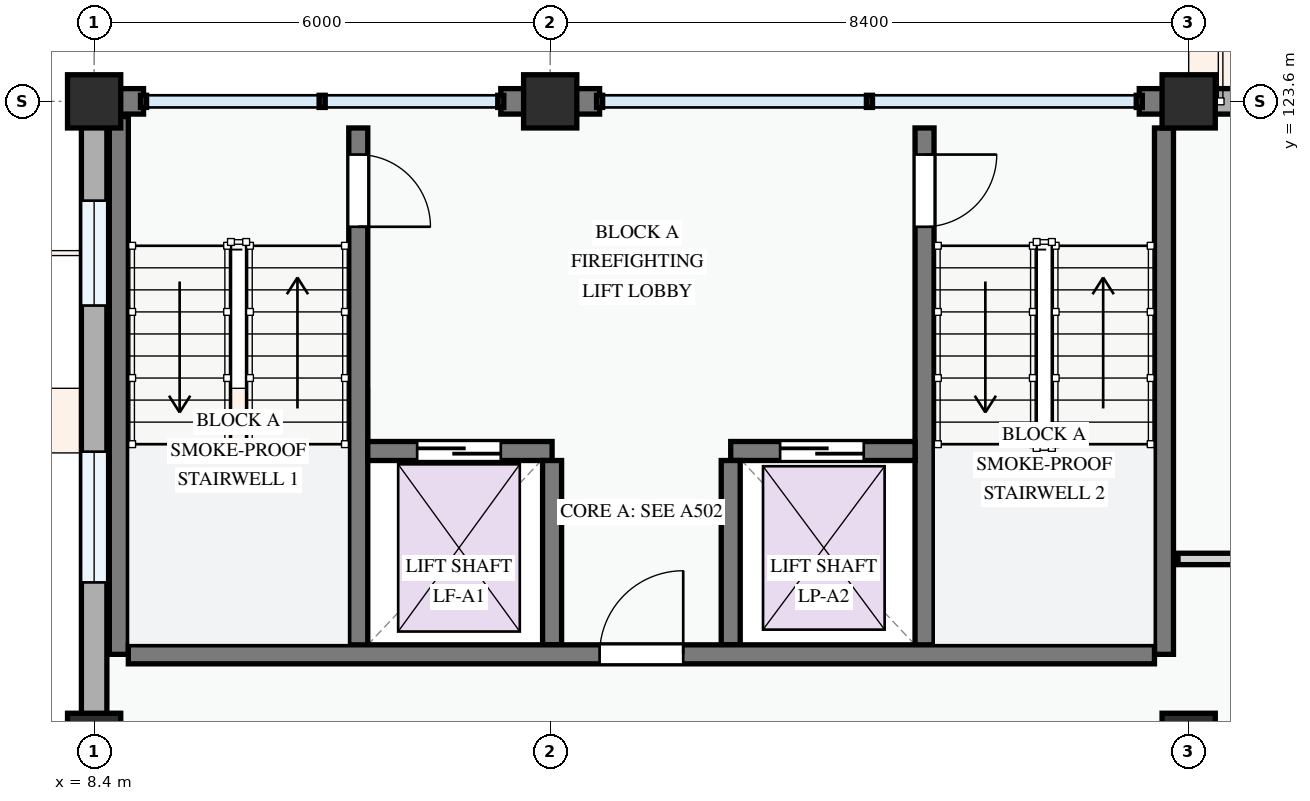
"""IFC4 building model, lengths in metres.
Left out: names, types, materials, properties, quantities, classifications, styles, units other than length and angle.
Written with IfcOpenShell. Run it as: python <this file> out.ifc"""

import sys

from ifc_helpers import new_model, si_unit, direction, frame, frame_2d, origin, origin_2d, place, context, subcontext, project, spatial, rectangle, extrude, element, fill, save


model = new_model("IFC4")
c1 = context("Model", 3, precision=1e-05, world=origin(), true_north=direction((0.0, 1.0)))
c2 = subcontext(c1, "Body", "Model", "MODEL_VIEW")
j1 = project(units=[si_unit("LENGTHUNIT", "METRE"), si_unit("PLANEANGLEUNIT", "RADIAN")], contexts=[c1])
p1 = place(None, origin())
s1 = spatial("IfcSite", under=j1, at=p1, CompositionType="ELEMENT")
p2 = place(p1, origin())
s2 = spatial("IfcBuilding", under=s1, at=p2, CompositionType="ELEMENT")
p3 = place(p2, frame((0.0, 0.0, 18.0)))
s3 = spatial("IfcBuildingStorey", under=s2, at=p3, CompositionType="ELEMENT", Elevation=18.0)
for number, where, z_axis, x_axis in (
    (1, (8.4, 115.2, 0.0), (0.0, 0.0, 1.0), (1.0, 0.0, 0.0)),
    (2, (8.4, 123.6, 0.0), (0.0, 0.0, 1.0), (1.0, 0.0, 0.0)),
    (3, (14.4, 123.6, 0.0), (0.0, 0.0, 1.0), (1.0, 0.0, 0.0)),
    (4, (22.8, 115.2, 0.0), (0.0, 0.0, 1.0), (1.0, 0.0, 0.0)),
    (5, (22.8, 123.6, 0.0), (0.0, 0.0, 1.0), (1.0, 0.0, 0.0)),
):
    element("IfcColumn", number, at=place(p3, frame(where, z_axis=z_axis, x_axis=x_axis)), inside=s3, PredefinedType="COLUMN", context=c2, shape_type="SweptSolid", body=[
        extrude(rectangle(XDim=0.7, YDim=0.7, at=origin_2d()), origin(), (0.0, 0.0, 1.0), 3.3),
    ])
p4 = place(p3, frame((28.8, 123.6, 0.0), z_axis=(0.0, 0.0, 1.0), x_axis=(-1.0, 0.0, 0.0)))
e6 = element("IfcWall", 6, at=p4, inside=s3, PredefinedType="STANDARD", context=c2, shape_type="SweptSolid", body=[
    extrude(rectangle(XDim=6.0, YDim=0.335, at=frame_2d((3.0, 0.0))), origin(), (0.0, 0.0, 1.0), 2.475),
])
p5 = place(p4, frame((0.62, 0.0, 0.0)))
e7 = element("IfcOpeningElement", 7, at=p5, cuts=e6, PredefinedType="OPENING", context=c2, shape_type="SweptSolid", body=[
    extrude(rectangle(XDim=1.5, YDim=2.2, at=frame_2d((0.75, 1.1))), frame((0.0, 0.177, 0.0), z_axis=(0.0, -1.0, 0.0), x_axis=(1.0, 0.0, 0.0)), (0.0, 0.0, 1.0), 0.355),
])
p6 = place(p4, frame((3.215, 0.0, 0.78)))
e8 = element("IfcOpeningElement", 8, at=p6, cuts=e6, PredefinedType="OPENING", context=c2, shape_type="SweptSolid", body=[
    extrude(rectangle(XDim=1.55, YDim=1.4, at=frame_2d((0.775, 0.7))), frame((0.0, 0.177, 0.0), z_axis=(0.0, -1.0, 0.0), x_axis=(1.0, 0.0, 0.0)), (0.0, 0.0, 1.0), 0.355),
])
for number, where, z_axis, x_axis in (
    (9, (22.8, 123.6, 0.0), (0.0, 0.0, 1.0), (-1.0, 0.0, 0.0)),
    (10, (15.05, 123.6, 0.0), (0.0, 0.0, 1.0), (-1.0, 0.0, 0.0)),
):
    element("IfcWall", number, at=place(p3, frame(where, z_axis=z_axis, x_axis=x_axis)), inside=s3, PredefinedType="STANDARD", context=c2, shape_type="SweptSolid", body=[
        extrude(rectangle(XDim=0.65, YDim=0.335, at=frame_2d((0.325, 0.0))), origin(), (0.0, 0.0, 1.0), 3.04),
    ])
p7 = place(p3, frame((14.4, 123.6, 0.0), z_axis=(0.0, 0.0, 1.0), x_axis=(-1.0, 0.0, 0.0)))
e11 = element("IfcWall", 11, at=p7, inside=s3, PredefinedType="STANDARD", context=c2, shape_type="SweptSolid", body=[
    extrude(rectangle(XDim=0.65, YDim=0.335, at=frame_2d((0.325, 0.0))), origin(), (0.0, 0.0, 1.0), 3.04),
])
p8 = place(p3, frame((9.05, 123.6, 0.0), z_axis=(0.0, 0.0, 1.0), x_axis=(-1.0, 0.0, 0.0)))
e12 = element("IfcWall", 12, at=p8, inside=s3, PredefinedType="STANDARD", context=c2, shape_type="SweptSolid", body=[
    extrude(rectangle(XDim=0.48, YDim=0.335, at=frame_2d((0.24, 0.0))), origin(), (0.0, 0.0, 1.0), 3.04),
])
p9 = place(p3, frame((8.4, 123.6, 0.0), z_axis=(0.0, 0.0, 1.0), x_axis=(0.0, -1.0, 0.0)))
e13 = element("IfcWall", 13, at=p9, inside=s3, PredefinedType="STANDARD", context=c2, shape_type="SweptSolid", body=[
    extrude(rectangle(XDim=8.4, YDim=0.335, at=frame_2d((4.2, 0.0))), origin(), (0.0, 0.0, 1.0), 2.425),
])
p10 = place(p9, frame((1.306, 0.0, 0.78)))
e14 = element("IfcOpeningElement", 14, at=p10, cuts=e13, PredefinedType="OPENING", context=c2, shape_type="SweptSolid", body=[
    extrude(rectangle(XDim=1.38, YDim=1.48, at=frame_2d((0.69, 0.74))), frame((0.0, 0.177, 0.0), z_axis=(0.0, -1.0, 0.0), x_axis=(1.0, 0.0, 0.0)), (0.0, 0.0, 1.0), 0.355),
])
p11 = place(p9, frame((4.609, 0.0, 0.78)))
e15 = element("IfcOpeningElement", 15, at=p11, cuts=e13, PredefinedType="OPENING", context=c2, shape_type="SweptSolid", body=[
    extrude(rectangle(XDim=1.72, YDim=1.52, at=frame_2d((0.86, 0.76))), frame((0.0, 0.177, 0.0), z_axis=(0.0, -1.0, 0.0), x_axis=(1.0, 0.0, 0.0)), (0.0, 0.0, 1.0), 0.355),
])
p12 = place(p3, frame((11.875, 123.25, 0.0), z_axis=(0.0, 0.0, 1.0), x_axis=(0.0, -1.0, 0.0)))
e16 = element("IfcWall", 16, at=p12, inside=s3, PredefinedType="SHEAR", context=c2, shape_type="SweptSolid", body=[
    extrude(rectangle(XDim=6.925, YDim=0.25, at=frame_2d((3.462, 0.0))), origin(), (0.0, 0.0, 1.0), 3.0),
])
p13 = place(p12, frame((0.35, 0.0, 0.0)))
e17 = element("IfcOpeningElement", 17, at=p13, cuts=e16, PredefinedType="OPENING", context=c2, shape_type="SweptSolid", body=[
    extrude(rectangle(XDim=0.95, YDim=2.1, at=frame_2d((0.475, 1.05))), frame((0.0, 0.135, 0.0), z_axis=(0.0, -1.0, 0.0), x_axis=(1.0, 0.0, 0.0)), (0.0, 0.0, 1.0), 0.27),
])
p14 = place(p3, frame((8.725, 123.4, 0.0), z_axis=(0.0, 0.0, 1.0), x_axis=(0.0, -1.0, 0.0)))
e18 = element("IfcWall", 18, at=p14, inside=s3, PredefinedType="SHEAR", context=c2, shape_type="SweptSolid", body=[
    extrude(rectangle(XDim=7.075, YDim=0.25, at=frame_2d((3.538, 0.0))), origin(), (0.0, 0.0, 1.0), 3.0),
])
p15 = place(p3, frame((22.475, 123.25, 0.0), z_axis=(0.0, 0.0, 1.0), x_axis=(0.0, -1.0, 0.0)))
e19 = element("IfcWall", 19, at=p15, inside=s3, PredefinedType="SHEAR", context=c2, shape_type="SweptSolid", body=[
    extrude(rectangle(XDim=6.925, YDim=0.25, at=frame_2d((3.462, 0.0))), origin(), (0.0, 0.0, 1.0), 3.0),
])
p16 = place(p3, frame((19.325, 123.25, 0.0), z_axis=(0.0, 0.0, 1.0), x_axis=(0.0, -1.0, 0.0)))
e20 = element("IfcWall", 20, at=p16, inside=s3, PredefinedType="SHEAR", context=c2, shape_type="SweptSolid", body=[
    extrude(rectangle(XDim=6.925, YDim=0.25, at=frame_2d((3.462, 0.0))), origin(), (0.0, 0.0, 1.0), 3.0),
])
p17 = place(p16, frame((0.35, 0.0, 0.0)))
e21 = element("IfcOpeningElement", 21, at=p17, cuts=e20, PredefinedType="OPENING", context=c2, shape_type="SweptSolid", body=[
    extrude(rectangle(XDim=0.95, YDim=2.1, at=frame_2d((0.475, 1.05))), frame((0.0, 0.135, 0.0), z_axis=(0.0, -1.0, 0.0), x_axis=(1.0, 0.0, 0.0)), (0.0, 0.0, 1.0), 0.27),
])
p18 = place(p3, frame((12.0, 119.0, 0.0), z_axis=(0.0, 0.0, 1.0), x_axis=(1.0, 0.0, 0.0)))
e22 = element("IfcWall", 22, at=p18, inside=s3, PredefinedType="SHEAR", context=c2, shape_type="SweptSolid", body=[
    extrude(rectangle(XDim=2.425, YDim=0.25, at=frame_2d((1.212, 0.0))), origin(), (0.0, 0.0, 1.0), 3.0),
])
p19 = place(p18, frame((0.65, 0.0, 0.0)))
e23 = element("IfcOpeningElement", 23, at=p19, cuts=e22, PredefinedType="OPENING", context=c2, shape_type="SweptSolid", body=[
    extrude(rectangle(XDim=1.1, YDim=2.15, at=frame_2d((0.55, 1.075))), frame((0.0, 0.135, 0.0), z_axis=(0.0, -1.0, 0.0), x_axis=(1.0, 0.0, 0.0)), (0.0, 0.0, 1.0), 0.27),
])
p20 = place(p3, frame((16.775, 119.0, 0.0), z_axis=(0.0, 0.0, 1.0), x_axis=(1.0, 0.0, 0.0)))
e24 = element("IfcWall", 24, at=p20, inside=s3, PredefinedType="SHEAR", context=c2, shape_type="SweptSolid", body=[
    extrude(rectangle(XDim=2.425, YDim=0.25, at=frame_2d((1.212, 0.0))), origin(), (0.0, 0.0, 1.0), 3.0),
])
p21 = place(p20, frame((0.65, 0.0, 0.0)))
e25 = element("IfcOpeningElement", 25, at=p21, cuts=e24, PredefinedType="OPENING", context=c2, shape_type="SweptSolid", body=[
    extrude(rectangle(XDim=1.1, YDim=2.15, at=frame_2d((0.55, 1.075))), frame((0.0, 0.135, 0.0), z_axis=(0.0, -1.0, 0.0), x_axis=(1.0, 0.0, 0.0)), (0.0, 0.0, 1.0), 0.27),
])
for number, where, z_axis, x_axis in (
    (26, (14.425, 118.875, 0.0), (0.0, 0.0, 1.0), (0.0, -1.0, 0.0)),
    (27, (16.775, 118.875, 0.0), (0.0, 0.0, 1.0), (0.0, -1.0, 0.0)),
):
    element("IfcWall", number, at=place(p3, frame(where, z_axis=z_axis, x_axis=x_axis)), inside=s3, PredefinedType="SHEAR", context=c2, shape_type="SweptSolid", body=[
        extrude(rectangle(XDim=2.425, YDim=0.25, at=frame_2d((1.212, 0.0))), origin(), (0.0, 0.0, 1.0), 3.0),
    ])
p22 = place(p3, frame((8.85, 116.325, 0.0), z_axis=(0.0, 0.0, 1.0), x_axis=(1.0, 0.0, 0.0)))
e28 = element("IfcWall", 28, at=p22, inside=s3, PredefinedType="SHEAR", context=c2, shape_type="SweptSolid", body=[
    extrude(rectangle(XDim=13.5, YDim=0.25, at=frame_2d((6.75, 0.0))), origin(), (0.0, 0.0, 1.0), 3.0),
])
p23 = place(p22, frame((6.2, 0.0, 0.0)))
e29 = element("IfcOpeningElement", 29, at=p23, cuts=e28, PredefinedType="OPENING", context=c2, shape_type="SweptSolid", body=[
    extrude(rectangle(XDim=1.1, YDim=2.15, at=frame_2d((0.55, 1.075))), frame((0.0, 0.135, 0.0), z_axis=(0.0, -1.0, 0.0), x_axis=(1.0, 0.0, 0.0)), (0.0, 0.0, 1.0), 0.27),
])
p24 = place(p3, frame((22.66, 117.58, 0.0), z_axis=(0.0, 0.0, 1.0), x_axis=(1.0, 0.0, 0.0)))
e30 = element("IfcWall", 30, at=p24, inside=s3, PredefinedType="PARTITIONING", context=c2, shape_type="SweptSolid", body=[
    extrude(rectangle(XDim=34.88, YDim=0.15, at=frame_2d((17.44, 0.0))), origin(), (0.0, 0.0, 1.0), 3.0),
])
p25 = place(p24, frame((2.74, 0.0, 0.0)))
e31 = element("IfcOpeningElement", 31, at=p25, cuts=e30, PredefinedType="OPENING", context=c2, shape_type="SweptSolid", body=[
    extrude(rectangle(XDim=0.92, YDim=2.1, at=frame_2d((0.46, 1.05))), frame((0.0, 0.085, 0.0), z_axis=(0.0, -1.0, 0.0), x_axis=(1.0, 0.0, 0.0)), (0.0, 0.0, 1.0), 0.17),
])
p26 = place(p24, frame((16.285, 0.0, 0.0)))
e32 = element("IfcOpeningElement", 32, at=p26, cuts=e30, PredefinedType="OPENING", context=c2, shape_type="SweptSolid", body=[
    extrude(rectangle(XDim=0.92, YDim=2.1, at=frame_2d((0.46, 1.05))), frame((0.0, 0.085, 0.0), z_axis=(0.0, -1.0, 0.0), x_axis=(1.0, 0.0, 0.0)), (0.0, 0.0, 1.0), 0.17),
])
p27 = place(p24, frame((24.263, 0.0, 0.0)))
e33 = element("IfcOpeningElement", 33, at=p27, cuts=e30, PredefinedType="OPENING", context=c2, shape_type="SweptSolid", body=[
    extrude(rectangle(XDim=0.96, YDim=2.12, at=frame_2d((0.48, 1.06))), frame((0.0, 0.085, 0.0), z_axis=(0.0, -1.0, 0.0), x_axis=(1.0, 0.0, 0.0)), (0.0, 0.0, 1.0), 0.17),
])
p28 = place(p10, origin())
e34 = element("IfcWindow", 34, at=p28, inside=s3, PartitioningType="SINGLE_PANEL", PredefinedType="WINDOW", context=c2, shape_type="SweptSolid", body=[
    extrude(rectangle(XDim=1.38, YDim=1.48, at=frame_2d((0.69, 0.74))), frame((0.0, 0.03, 0.0), z_axis=(0.0, -1.0, 0.0), x_axis=(1.0, 0.0, 0.0)), (0.0, 0.0, 1.0), 0.06),
])
fill(e14, e34)
p29 = place(p11, origin())
e35 = element("IfcWindow", 35, at=p29, inside=s3, PartitioningType="DOUBLE_PANEL_VERTICAL", PredefinedType="WINDOW", context=c2, shape_type="SweptSolid", body=[
    extrude(rectangle(XDim=1.72, YDim=1.52, at=frame_2d((0.86, 0.76))), frame((0.0, 0.03, 0.0), z_axis=(0.0, -1.0, 0.0), x_axis=(1.0, 0.0, 0.0)), (0.0, 0.0, 1.0), 0.06),
])
fill(e15, e35)
p30 = place(p13, origin())
e36 = element("IfcDoor", 36, at=p30, inside=s3, OperationType="SINGLE_SWING_RIGHT", PredefinedType="DOOR", context=c2, shape_type="SweptSolid", body=[
    extrude(rectangle(XDim=0.95, YDim=2.1, at=frame_2d((0.475, 1.05))), frame((0.0, 0.025, 0.0), z_axis=(0.0, -1.0, 0.0), x_axis=(1.0, 0.0, 0.0)), (0.0, 0.0, 1.0), 0.05),
])
fill(e17, e36)
p31 = place(p17, origin())
e37 = element("IfcDoor", 37, at=p31, inside=s3, OperationType="SINGLE_SWING_LEFT", PredefinedType="DOOR", context=c2, shape_type="SweptSolid", body=[
    extrude(rectangle(XDim=0.95, YDim=2.1, at=frame_2d((0.475, 1.05))), frame((0.0, 0.025, 0.0), z_axis=(0.0, -1.0, 0.0), x_axis=(1.0, 0.0, 0.0)), (0.0, 0.0, 1.0), 0.05),
])
fill(e21, e37)
p32 = place(p19, origin())
e38 = element("IfcDoor", 38, at=p32, inside=s3, OperationType="SLIDING_TO_LEFT", PredefinedType="DOOR", context=c2, shape_type="SweptSolid", body=[
    extrude(rectangle(XDim=1.1, YDim=2.15, at=frame_2d((0.55, 1.075))), frame((0.0, 0.025, 0.0), z_axis=(0.0, -1.0, 0.0), x_axis=(1.0, 0.0, 0.0)), (0.0, 0.0, 1.0), 0.05),
])
fill(e23, e38)
p33 = place(p21, origin())
e39 = element("IfcDoor", 39, at=p33, inside=s3, OperationType="SLIDING_TO_LEFT", PredefinedType="DOOR", context=c2, shape_type="SweptSolid", body=[
    extrude(rectangle(XDim=1.1, YDim=2.15, at=frame_2d((0.55, 1.075))), frame((0.0, 0.025, 0.0), z_axis=(0.0, -1.0, 0.0), x_axis=(1.0, 0.0, 0.0)), (0.0, 0.0, 1.0), 0.05),
])
fill(e25, e39)
p34 = place(p23, origin())
e40 = element("IfcDoor", 40, at=p34, inside=s3, OperationType="SINGLE_SWING_RIGHT", PredefinedType="DOOR", context=c2, shape_type="SweptSolid", body=[
    extrude(rectangle(XDim=1.1, YDim=2.15, at=frame_2d((0.55, 1.075))), frame((0.0, 0.025, 0.0), z_axis=(0.0, -1.0, 0.0), x_axis=(1.0, 0.0, 0.0)), (0.0, 0.0, 1.0), 0.05),
])
fill(e29, e40)
save(model, sys.argv[1])
